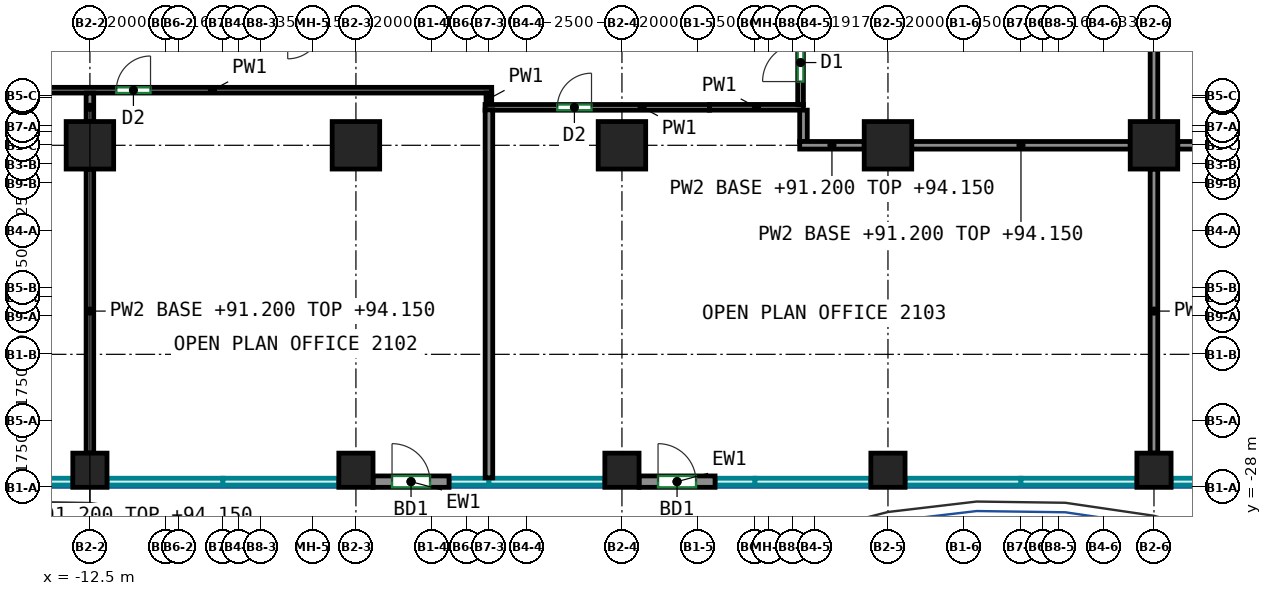
"""IFC4 building model, lengths in metres.
Left out: names, types, materials, properties, quantities, classifications, styles, units other than length and angle.
Written with IfcOpenShell. Run it as: python <this file> out.ifc"""

import sys

from ifc_helpers import new_model, si_unit, direction, frame, frame_2d, origin, origin_2d, place, context, subcontext, project, spatial, rectangle, extrude, source, transform, mapped, element, fill, save


model = new_model("IFC4")
c1 = context("Model", 3, precision=1e-05, world=origin(), true_north=direction((0.0, 1.0)))
c2 = subcontext(c1, "Body", "Model", "MODEL_VIEW")
j1 = project(units=[si_unit("LENGTHUNIT", "METRE"), si_unit("PLANEANGLEUNIT", "RADIAN")], contexts=[c1])
p1 = place(None, origin())
s1 = spatial("IfcSite", under=j1, at=p1, CompositionType="ELEMENT")
p2 = place(p1, origin())
s2 = spatial("IfcBuilding", under=s1, at=p2, CompositionType="ELEMENT")
p3 = place(p2, frame((0.0, 0.0, 91.2)))
s3 = spatial("IfcBuildingStorey", under=s2, at=p3, CompositionType="ELEMENT", Elevation=91.2)
m1 = source(origin(), c2, "Body", "SweptSolid", [
    extrude(rectangle(XDim=0.9, YDim=0.9, at=origin_2d()), origin(), (0.0, 0.0, 1.0), 3.6),
])
p4 = place(p3, frame((-12.5, -27.55, 0.0), z_axis=(0.0, 0.0, 1.0), x_axis=(1.0, 0.0, 0.0)))
e1 = element("IfcColumn", 1, at=p4, inside=s3, PredefinedType="COLUMN", context=c2, shape_type="MappedRepresentation", body=[
    mapped(m1, transform((0.0, 0.0, 0.0))),
])
m2 = source(origin(), c2, "Body", "SweptSolid", [
    extrude(rectangle(XDim=1.25, YDim=1.25, at=origin_2d()), origin(), (0.0, 0.0, 1.0), 3.6),
])
p5 = place(p3, frame((-12.5, -19.0, 0.0), z_axis=(0.0, 0.0, 1.0), x_axis=(1.0, 0.0, 0.0)))
e2 = element("IfcColumn", 2, at=p5, inside=s3, PredefinedType="COLUMN", context=c2, shape_type="MappedRepresentation", body=[
    mapped(m2, transform((0.0, 0.0, 0.0))),
])
p6 = place(p3, frame((-5.5, -27.55, 0.0), z_axis=(0.0, 0.0, 1.0), x_axis=(1.0, 0.0, 0.0)))
e3 = element("IfcColumn", 3, at=p6, inside=s3, PredefinedType="COLUMN", context=c2, shape_type="MappedRepresentation", body=[
    mapped(m1, transform((0.0, 0.0, 0.0))),
])
p7 = place(p3, frame((-5.5, -19.0, 0.0), z_axis=(0.0, 0.0, 1.0), x_axis=(1.0, 0.0, 0.0)))
e4 = element("IfcColumn", 4, at=p7, inside=s3, PredefinedType="COLUMN", context=c2, shape_type="MappedRepresentation", body=[
    mapped(m2, transform((0.0, 0.0, 0.0))),
])
p8 = place(p3, frame((1.5, -27.55, 0.0), z_axis=(0.0, 0.0, 1.0), x_axis=(1.0, 0.0, 0.0)))
e5 = element("IfcColumn", 5, at=p8, inside=s3, PredefinedType="COLUMN", context=c2, shape_type="MappedRepresentation", body=[
    mapped(m1, transform((0.0, 0.0, 0.0))),
])
p9 = place(p3, frame((1.5, -19.0, 0.0), z_axis=(0.0, 0.0, 1.0), x_axis=(1.0, 0.0, 0.0)))
e6 = element("IfcColumn", 6, at=p9, inside=s3, PredefinedType="COLUMN", context=c2, shape_type="MappedRepresentation", body=[
    mapped(m2, transform((0.0, 0.0, 0.0))),
])
p10 = place(p3, frame((8.5, -27.55, 0.0), z_axis=(0.0, 0.0, 1.0), x_axis=(1.0, 0.0, 0.0)))
e7 = element("IfcColumn", 7, at=p10, inside=s3, PredefinedType="COLUMN", context=c2, shape_type="MappedRepresentation", body=[
    mapped(m1, transform((0.0, 0.0, 0.0))),
])
p11 = place(p3, frame((8.5, -19.0, 0.0), z_axis=(0.0, 0.0, 1.0), x_axis=(1.0, 0.0, 0.0)))
e8 = element("IfcColumn", 8, at=p11, inside=s3, PredefinedType="COLUMN", context=c2, shape_type="MappedRepresentation", body=[
    mapped(m2, transform((0.0, 0.0, 0.0))),
])
p12 = place(p3, frame((15.5, -27.55, 0.0), z_axis=(0.0, 0.0, 1.0), x_axis=(1.0, 0.0, 0.0)))
e9 = element("IfcColumn", 9, at=p12, inside=s3, PredefinedType="COLUMN", context=c2, shape_type="MappedRepresentation", body=[
    mapped(m1, transform((0.0, 0.0, 0.0))),
])
p13 = place(p3, frame((15.5, -19.0, 0.0), z_axis=(0.0, 0.0, 1.0), x_axis=(1.0, 0.0, 0.0)))
e10 = element("IfcColumn", 10, at=p13, inside=s3, PredefinedType="COLUMN", context=c2, shape_type="MappedRepresentation", body=[
    mapped(m2, transform((0.0, 0.0, 0.0))),
])
m3 = source(origin(), c2, "Body", "SweptSolid", [
    extrude(rectangle(XDim=2.0, YDim=0.3, at=frame_2d((1.0, 0.0))), origin(), (0.0, 0.0, 1.0), 3.6),
])
p14 = place(p3, frame((-5.05, -27.85, 0.0), z_axis=(0.0, 0.0, 1.0), x_axis=(1.0, 0.0, 0.0)))
e11 = element("IfcWall", 11, at=p14, inside=s3, PredefinedType="SOLIDWALL", context=c2, shape_type="MappedRepresentation", body=[
    mapped(m3, transform((0.0, 0.0, 0.0))),
])
p15 = place(p14, frame((0.5, 0.0, 0.0)))
e12 = element("IfcOpeningElement", 12, at=p15, cuts=e11, PredefinedType="OPENING", context=c2, shape_type="SweptSolid", body=[
    extrude(rectangle(XDim=1.0, YDim=2.1, at=frame_2d((0.5, 1.05))), frame((0.0, 0.16, 0.0), z_axis=(0.0, -1.0, 0.0), x_axis=(1.0, 0.0, 0.0)), (0.0, 0.0, 1.0), 0.32),
])
p16 = place(p3, frame((1.95, -27.85, 0.0), z_axis=(0.0, 0.0, 1.0), x_axis=(1.0, 0.0, 0.0)))
e13 = element("IfcWall", 13, at=p16, inside=s3, PredefinedType="SOLIDWALL", context=c2, shape_type="MappedRepresentation", body=[
    mapped(m3, transform((0.0, 0.0, 0.0))),
])
p17 = place(p16, frame((0.5, 0.0, 0.0)))
e14 = element("IfcOpeningElement", 14, at=p17, cuts=e13, PredefinedType="OPENING", context=c2, shape_type="SweptSolid", body=[
    extrude(rectangle(XDim=1.0, YDim=2.1, at=frame_2d((0.5, 1.05))), frame((0.0, 0.16, 0.0), z_axis=(0.0, -1.0, 0.0), x_axis=(1.0, 0.0, 0.0)), (0.0, 0.0, 1.0), 0.32),
])
p18 = place(p3, frame((-16.625, -17.55, 0.0), z_axis=(0.0, 0.0, 1.0), x_axis=(1.0, 0.0, 0.0)))
e15 = element("IfcWall", 15, at=p18, inside=s3, PredefinedType="PARTITIONING", context=c2, shape_type="SweptSolid", body=[
    extrude(rectangle(XDim=14.698, YDim=0.15, at=frame_2d((7.349, 0.0))), origin(), (0.0, 0.0, 1.0), 3.6),
])
p19 = place(p18, frame((0.811, 0.0, 0.0)))
e16 = element("IfcOpeningElement", 16, at=p19, cuts=e15, PredefinedType="OPENING", context=c2, shape_type="SweptSolid", body=[
    extrude(rectangle(XDim=1.8, YDim=2.1, at=frame_2d((0.9, 1.05))), frame((0.0, 0.085, 0.0), z_axis=(0.0, -1.0, 0.0), x_axis=(1.0, 0.0, 0.0)), (0.0, 0.0, 1.0), 0.17),
])
p20 = place(p18, frame((4.82, 0.0, 0.0)))
e17 = element("IfcOpeningElement", 17, at=p20, cuts=e15, PredefinedType="OPENING", context=c2, shape_type="SweptSolid", body=[
    extrude(rectangle(XDim=0.9, YDim=2.1, at=frame_2d((0.45, 1.05))), frame((0.0, 0.085, 0.0), z_axis=(0.0, -1.0, 0.0), x_axis=(1.0, 0.0, 0.0)), (0.0, 0.0, 1.0), 0.17),
])
p21 = place(p3, frame((-2.002, -17.625, 0.0), z_axis=(0.0, 0.0, 1.0), x_axis=(0.0, -1.0, 0.0)))
e18 = element("IfcWall", 18, at=p21, inside=s3, PredefinedType="PARTITIONING", context=c2, shape_type="SweptSolid", body=[
    extrude(rectangle(XDim=0.302, YDim=0.15, at=frame_2d((0.151, 0.0))), origin(), (0.0, 0.0, 1.0), 3.6),
])
p22 = place(p3, frame((3.802, -18.0, 0.0), z_axis=(0.0, 0.0, 1.0), x_axis=(1.0, 0.0, 0.0)))
e19 = element("IfcWall", 19, at=p22, inside=s3, PredefinedType="PARTITIONING", context=c2, shape_type="SweptSolid", body=[
    extrude(rectangle(XDim=2.473, YDim=0.15, at=frame_2d((1.236, 0.0))), origin(), (0.0, 0.0, 1.0), 3.6),
])
p23 = place(p3, frame((-2.102, -18.002, 0.0), z_axis=(0.0, 0.0, 1.0), x_axis=(1.0, 0.0, 0.0)))
e20 = element("IfcWall", 20, at=p23, inside=s3, PredefinedType="PARTITIONING", context=c2, shape_type="SweptSolid", body=[
    extrude(rectangle(XDim=5.904, YDim=0.15, at=frame_2d((2.952, 0.0))), origin(), (0.0, 0.0, 1.0), 3.6),
])
p24 = place(p23, frame((1.901, 0.0, 0.0)))
e21 = element("IfcOpeningElement", 21, at=p24, cuts=e20, PredefinedType="OPENING", context=c2, shape_type="SweptSolid", body=[
    extrude(rectangle(XDim=0.9, YDim=2.1, at=frame_2d((0.45, 1.05))), frame((0.0, 0.085, 0.0), z_axis=(0.0, -1.0, 0.0), x_axis=(1.0, 0.0, 0.0)), (0.0, 0.0, 1.0), 0.17),
])
p25 = place(p3, frame((6.2, -17.925, 0.0), z_axis=(0.0, 0.0, 1.0), x_axis=(0.0, 1.0, 0.0)))
e22 = element("IfcWall", 22, at=p25, inside=s3, PredefinedType="PARTITIONING", context=c2, shape_type="SweptSolid", body=[
    extrude(rectangle(XDim=7.835, YDim=0.15, at=frame_2d((3.917, 0.0))), origin(), (0.0, 0.0, 1.0), 3.6),
])
p26 = place(p25, frame((0.602, 0.0, 0.0)))
e23 = element("IfcOpeningElement", 23, at=p26, cuts=e22, PredefinedType="OPENING", context=c2, shape_type="SweptSolid", body=[
    extrude(rectangle(XDim=1.0, YDim=2.1, at=frame_2d((0.5, 1.05))), frame((0.0, 0.085, 0.0), z_axis=(0.0, -1.0, 0.0), x_axis=(1.0, 0.0, 0.0)), (0.0, 0.0, 1.0), 0.17),
])
p27 = place(p3, frame((-12.5, -18.375, 0.0), z_axis=(0.0, 0.0, 1.0), x_axis=(0.0, 1.0, 0.0)))
e24 = element("IfcWall", 24, at=p27, inside=s3, PredefinedType="PARTITIONING", context=c2, shape_type="SweptSolid", body=[
    extrude(rectangle(XDim=0.749, YDim=0.2, at=frame_2d((0.375, 0.0))), origin(), (0.0, 0.0, 1.0), 2.95),
])
p28 = place(p3, frame((-12.5, -27.1, 0.0), z_axis=(0.0, 0.0, 1.0), x_axis=(0.0, 1.0, 0.0)))
e25 = element("IfcWall", 25, at=p28, inside=s3, PredefinedType="PARTITIONING", context=c2, shape_type="SweptSolid", body=[
    extrude(rectangle(XDim=7.475, YDim=0.2, at=frame_2d((3.738, 0.0))), origin(), (0.0, 0.0, 1.0), 2.95),
])
p29 = place(p3, frame((-2.0, -27.75, 0.0), z_axis=(0.0, 0.0, 1.0), x_axis=(0.0, 1.0, 0.0)))
e26 = element("IfcWall", 26, at=p29, inside=s3, PredefinedType="PARTITIONING", context=c2, shape_type="SweptSolid", body=[
    extrude(rectangle(XDim=9.683, YDim=0.2, at=frame_2d((4.842, 0.0))), origin(), (0.0, 0.0, 1.0), 3.6),
])
p30 = place(p3, frame((6.277, -18.9, 0.0), z_axis=(0.0, 0.0, 1.0), x_axis=(0.0, 1.0, 0.0)))
e27 = element("IfcWall", 27, at=p30, inside=s3, PredefinedType="PARTITIONING", context=c2, shape_type="SweptSolid", body=[
    extrude(rectangle(XDim=0.825, YDim=0.2, at=frame_2d((0.413, 0.0))), origin(), (0.0, 0.0, 1.0), 3.6),
])
p31 = place(p3, frame((6.177, -19.0, 0.0), z_axis=(0.0, 0.0, 1.0), x_axis=(1.0, 0.0, 0.0)))
e28 = element("IfcWall", 28, at=p31, inside=s3, PredefinedType="PARTITIONING", context=c2, shape_type="SweptSolid", body=[
    extrude(rectangle(XDim=1.698, YDim=0.2, at=frame_2d((0.849, 0.0))), origin(), (0.0, 0.0, 1.0), 2.95),
])
p32 = place(p3, frame((9.125, -19.0, 0.0), z_axis=(0.0, 0.0, 1.0), x_axis=(1.0, 0.0, 0.0)))
e29 = element("IfcWall", 29, at=p32, inside=s3, PredefinedType="PARTITIONING", context=c2, shape_type="SweptSolid", body=[
    extrude(rectangle(XDim=5.75, YDim=0.2, at=frame_2d((2.875, 0.0))), origin(), (0.0, 0.0, 1.0), 2.95),
])
p33 = place(p3, frame((15.5, -27.1, 0.0), z_axis=(0.0, 0.0, 1.0), x_axis=(0.0, 1.0, 0.0)))
e30 = element("IfcWall", 30, at=p33, inside=s3, PredefinedType="PARTITIONING", context=c2, shape_type="SweptSolid", body=[
    extrude(rectangle(XDim=7.475, YDim=0.2, at=frame_2d((3.738, 0.0))), origin(), (0.0, 0.0, 1.0), 2.95),
])
p34 = place(p3, frame((15.5, -18.375, 0.0), z_axis=(0.0, 0.0, 1.0), x_axis=(0.0, 1.0, 0.0)))
e31 = element("IfcWall", 31, at=p34, inside=s3, PredefinedType="PARTITIONING", context=c2, shape_type="SweptSolid", body=[
    extrude(rectangle(XDim=7.75, YDim=0.2, at=frame_2d((3.875, 0.0))), origin(), (0.0, 0.0, 1.0), 2.95),
])
p35 = place(p3, frame((16.125, -19.0, 0.0), z_axis=(0.0, 0.0, 1.0), x_axis=(1.0, 0.0, 0.0)))
e32 = element("IfcWall", 32, at=p35, inside=s3, PredefinedType="PARTITIONING", context=c2, shape_type="SweptSolid", body=[
    extrude(rectangle(XDim=5.75, YDim=0.2, at=frame_2d((2.875, 0.0))), origin(), (0.0, 0.0, 1.0), 2.95),
])
p36 = place(p15, origin())
e33 = element("IfcDoor", 33, at=p36, inside=s3, OperationType="SINGLE_SWING_LEFT", PredefinedType="DOOR", context=c2, shape_type="SweptSolid", body=[
    extrude(rectangle(XDim=1.0, YDim=2.1, at=frame_2d((0.5, 1.05))), frame((0.0, 0.025, 0.0), z_axis=(0.0, -1.0, 0.0), x_axis=(1.0, 0.0, 0.0)), (0.0, 0.0, 1.0), 0.05),
])
fill(e12, e33)
p37 = place(p17, origin())
e34 = element("IfcDoor", 34, at=p37, inside=s3, OperationType="SINGLE_SWING_LEFT", PredefinedType="DOOR", context=c2, shape_type="SweptSolid", body=[
    extrude(rectangle(XDim=1.0, YDim=2.1, at=frame_2d((0.5, 1.05))), frame((0.0, 0.025, 0.0), z_axis=(0.0, -1.0, 0.0), x_axis=(1.0, 0.0, 0.0)), (0.0, 0.0, 1.0), 0.05),
])
fill(e14, e34)
p38 = place(p24, origin())
e35 = element("IfcDoor", 35, at=p38, inside=s3, OperationType="SINGLE_SWING_RIGHT", PredefinedType="DOOR", context=c2, shape_type="SweptSolid", body=[
    extrude(rectangle(XDim=0.9, YDim=2.1, at=frame_2d((0.45, 1.05))), frame((0.0, 0.025, 0.0), z_axis=(0.0, -1.0, 0.0), x_axis=(1.0, 0.0, 0.0)), (0.0, 0.0, 1.0), 0.05),
])
fill(e21, e35)
p39 = place(p20, origin())
e36 = element("IfcDoor", 36, at=p39, inside=s3, OperationType="SINGLE_SWING_RIGHT", PredefinedType="DOOR", context=c2, shape_type="SweptSolid", body=[
    extrude(rectangle(XDim=0.9, YDim=2.1, at=frame_2d((0.45, 1.05))), frame((0.0, 0.025, 0.0), z_axis=(0.0, -1.0, 0.0), x_axis=(1.0, 0.0, 0.0)), (0.0, 0.0, 1.0), 0.05),
])
fill(e17, e36)
p40 = place(p26, origin())
e37 = element("IfcDoor", 37, at=p40, inside=s3, OperationType="SINGLE_SWING_LEFT", PredefinedType="DOOR", context=c2, shape_type="SweptSolid", body=[
    extrude(rectangle(XDim=1.0, YDim=2.1, at=frame_2d((0.5, 1.05))), frame((0.0, 0.025, 0.0), z_axis=(0.0, -1.0, 0.0), x_axis=(1.0, 0.0, 0.0)), (0.0, 0.0, 1.0), 0.05),
])
fill(e23, e37)
save(model, sys.argv[1])
